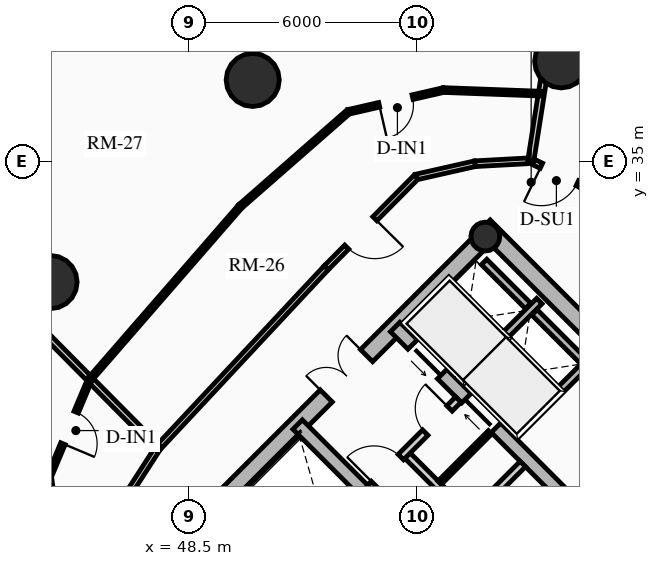
"""IFC4 building model, lengths in metres.
Left out: names, types, materials, properties, quantities, classifications, styles, units other than length and angle.
Written with IfcOpenShell. Run it as: python <this file> out.ifc"""

import sys

from ifc_helpers import new_model, si_unit, direction, frame, frame_2d, origin, origin_2d, place, context, subcontext, project, spatial, rectangle, circle, hollow_circle, extrude, source, transform, mapped, element, fill, save


model = new_model("IFC4")
c1 = context("Model", 3, precision=1e-05, world=origin(), true_north=direction((0.0, 1.0)))
c2 = subcontext(c1, "Body", "Model", "MODEL_VIEW")
j1 = project(units=[si_unit("LENGTHUNIT", "METRE"), si_unit("PLANEANGLEUNIT", "RADIAN")], contexts=[c1])
p1 = place(None, origin())
s1 = spatial("IfcSite", under=j1, at=p1, CompositionType="ELEMENT")
p2 = place(p1, origin())
s2 = spatial("IfcBuilding", under=s1, at=p2, CompositionType="ELEMENT")
p3 = place(p2, frame((0.0, 0.0, 90.52)))
s3 = spatial("IfcBuildingStorey", under=s2, at=p3, CompositionType="ELEMENT", Elevation=90.52)
p4 = place(p3, frame((66.303, 23.263, 0.0), z_axis=(0.0, 0.0, 1.0), x_axis=(-0.707106781187, 0.707106781187, 0.0)))
e1 = element("IfcWall", 1, at=p4, inside=s3, PredefinedType="SHEAR", context=c2, shape_type="SweptSolid", body=[
    extrude(rectangle(XDim=14.2, YDim=0.45, at=frame_2d((7.1, 0.0))), origin(), (0.0, 0.0, 1.0), 2.91),
])
p5 = place(p3, frame((48.856, 25.578, 0.0), z_axis=(0.0, 0.0, 1.0), x_axis=(0.707106781187, 0.707106781187, 0.0)))
e2 = element("IfcWall", 2, at=p5, inside=s3, PredefinedType="SHEAR", context=c2, shape_type="SweptSolid", body=[
    extrude(rectangle(XDim=10.7, YDim=0.45, at=frame_2d((5.35, 0.0))), origin(), (0.0, 0.0, 1.0), 2.91),
])
m1 = source(origin(), c2, "Body", "SweptSolid", [
    extrude(rectangle(XDim=1.5, YDim=2.02, at=frame_2d((0.75, 1.01))), frame((0.0, 0.235, 0.0), z_axis=(0.0, -1.0, 0.0), x_axis=(1.0, 0.0, 0.0)), (0.0, 0.0, 1.0), 0.47),
])
p6 = place(p5, frame((4.6, 0.0, 0.0)))
e3 = element("IfcOpeningElement", 3, at=p6, cuts=e2, PredefinedType="OPENING", context=c2, shape_type="MappedRepresentation", body=[
    mapped(m1, transform((0.0, 0.0, 0.0), x_axis=(1.0, 0.0, 0.0), y_axis=(0.0, 1.0, 0.0), z_axis=(0.0, 0.0, 1.0), scale=1.0)),
])
p7 = place(p3, frame((61.078, 18.355, 0.0), z_axis=(0.0, 0.0, 1.0), x_axis=(-0.707106781187, 0.707106781187, 0.0)))
e4 = element("IfcWall", 4, at=p7, inside=s3, PredefinedType="SHEAR", context=c2, shape_type="SweptSolid", body=[
    extrude(rectangle(XDim=13.75, YDim=0.35, at=frame_2d((6.875, 0.0))), origin(), (0.0, 0.0, 1.0), 2.91),
])
m2 = source(origin(), c2, "Body", "SweptSolid", [
    extrude(rectangle(XDim=1.1, YDim=2.015, at=frame_2d((0.55, 1.007))), frame((0.0, 0.185, 0.0), z_axis=(0.0, -1.0, 0.0), x_axis=(1.0, 0.0, 0.0)), (0.0, 0.0, 1.0), 0.37),
])
p8 = place(p7, frame((4.875, 0.0, 0.0)))
e5 = element("IfcOpeningElement", 5, at=p8, cuts=e4, PredefinedType="OPENING", context=c2, shape_type="MappedRepresentation", body=[
    mapped(m2, transform((0.0, 0.0, 0.0), x_axis=(1.0, 0.0, 0.0), y_axis=(0.0, 1.0, 0.0), z_axis=(0.0, 0.0, 1.0), scale=1.0)),
])
m3 = source(origin(), c2, "Body", "SweptSolid", [
    extrude(rectangle(XDim=1.15, YDim=2.02, at=frame_2d((0.575, 1.01))), frame((0.0, 0.185, 0.0), z_axis=(0.0, -1.0, 0.0), x_axis=(1.0, 0.0, 0.0)), (0.0, 0.0, 1.0), 0.37),
])
p9 = place(p7, frame((7.295, 0.0, 0.0)))
e6 = element("IfcOpeningElement", 6, at=p9, cuts=e4, PredefinedType="OPENING", context=c2, shape_type="MappedRepresentation", body=[
    mapped(m3, transform((0.0, 0.0, 0.0), x_axis=(1.0, 0.0, 0.0), y_axis=(0.0, 1.0, 0.0), z_axis=(0.0, 0.0, 1.0), scale=1.0)),
])
p10 = place(p3, frame((63.645, 20.922, 0.0), z_axis=(0.0, 0.0, 1.0), x_axis=(-0.707106781187, 0.707106781187, 0.0)))
e7 = element("IfcWall", 7, at=p10, inside=s3, PredefinedType="SHEAR", context=c2, shape_type="SweptSolid", body=[
    extrude(rectangle(XDim=13.75, YDim=0.35, at=frame_2d((6.875, 0.0))), origin(), (0.0, 0.0, 1.0), 2.91),
])
p11 = place(p10, frame((10.0, 0.0, 0.0)))
e8 = element("IfcOpeningElement", 8, at=p11, cuts=e7, PredefinedType="OPENING", context=c2, shape_type="MappedRepresentation", body=[
    mapped(m2, transform((0.0, 0.0, 0.0), x_axis=(1.0, 0.0, 0.0), y_axis=(0.0, 1.0, 0.0), z_axis=(0.0, 0.0, 1.0), scale=1.0)),
])
p12 = place(p10, frame((12.0, 0.0, 0.0)))
e9 = element("IfcOpeningElement", 9, at=p12, cuts=e7, PredefinedType="OPENING", context=c2, shape_type="MappedRepresentation", body=[
    mapped(m2, transform((0.0, 0.0, 0.0), x_axis=(1.0, 0.0, 0.0), y_axis=(0.0, 1.0, 0.0), z_axis=(0.0, 0.0, 1.0), scale=1.0)),
])
p13 = place(p10, frame((5.305, 0.0, 0.0)))
e10 = element("IfcOpeningElement", 10, at=p13, cuts=e7, PredefinedType="OPENING", context=c2, shape_type="MappedRepresentation", body=[
    mapped(m3, transform((0.0, 0.0, 0.0), x_axis=(1.0, 0.0, 0.0), y_axis=(0.0, 1.0, 0.0), z_axis=(0.0, 0.0, 1.0), scale=1.0)),
])
p14 = place(p3, frame((56.294, 33.024, 0.0), z_axis=(0.0, 0.0, 1.0), x_axis=(0.707106781187, 0.707106781187, 0.0)))
e11 = element("IfcColumn", 11, at=p14, inside=s3, PredefinedType="COLUMN", context=c2, shape_type="SweptSolid", body=[
    extrude(hollow_circle(Radius=0.38, WallThickness=0.032, at=origin_2d()), origin(), (0.0, 0.0, 1.0), 2.91),
])
for number, where, z_axis, x_axis in (
    (12, (58.291, 37.635, 0.0), (0.0, 0.0, 1.0), (1.0, 0.0, 0.0)),
    (13, (50.173, 37.146, 0.0), (0.0, 0.0, 1.0), (1.0, 0.0, 0.0)),
    (14, (44.854, 31.827, 0.0), (0.0, 0.0, 1.0), (1.0, 0.0, 0.0)),
):
    element("IfcColumn", number, at=place(p3, frame(where, z_axis=z_axis, x_axis=x_axis)), inside=s3, PredefinedType="USERDEFINED", context=c2, shape_type="SweptSolid", body=[
        extrude(circle(Radius=0.7, at=origin_2d()), origin(), (0.0, 0.0, 1.0), 2.91),
    ])
p15 = place(p3, frame((57.062, 27.781, 0.0), z_axis=(0.0, 0.0, 1.0), x_axis=(0.707106781187, 0.707106781187, 0.0)))
e15 = element("IfcWall", 15, at=p15, inside=s3, PredefinedType="SHEAR", context=c2, shape_type="SweptSolid", body=[
    extrude(rectangle(XDim=2.97, YDim=0.2, at=frame_2d((1.485, 0.0))), origin(), (0.0, 0.0, 1.0), 2.91),
])
p16 = place(p3, frame((55.615, 29.227, 0.0), z_axis=(0.0, 0.0, 1.0), x_axis=(0.707147878904, 0.70706568108, 0.0)))
e16 = element("IfcWall", 16, at=p16, inside=s3, PredefinedType="SHEAR", context=c2, shape_type="SweptSolid", body=[
    extrude(rectangle(XDim=2.97, YDim=0.2, at=frame_2d((1.485, 0.0))), origin(), (0.0, 0.0, 1.0), 2.91),
])
p17 = place(p3, frame((58.865, 29.754, 0.0), z_axis=(0.0, 0.0, 1.0), x_axis=(-0.707174411312, 0.707039144592, 0.0)))
e17 = element("IfcWall", 17, at=p17, inside=s3, PredefinedType="SHEAR", context=c2, shape_type="SweptSolid", body=[
    extrude(rectangle(XDim=1.805, YDim=0.2, at=frame_2d((0.902, 0.0))), origin(), (0.0, 0.0, 1.0), 2.91),
])
p18 = place(p3, frame((57.419, 31.2, 0.0), z_axis=(0.0, 0.0, 1.0), x_axis=(-0.707032117043, 0.707181437447, 0.0)))
e18 = element("IfcWall", 18, at=p18, inside=s3, PredefinedType="SHEAR", context=c2, shape_type="SweptSolid", body=[
    extrude(rectangle(XDim=1.635, YDim=0.2, at=frame_2d((0.817, 0.0))), origin(), (0.0, 0.0, 1.0), 2.91),
])
p19 = place(p3, frame((54.961, 24.719, 0.0), z_axis=(0.0, 0.0, 1.0), x_axis=(0.707106781187, 0.707106781187, 0.0)))
e19 = element("IfcWall", 19, at=p19, inside=s3, PredefinedType="PARTITIONING", context=c2, shape_type="SweptSolid", body=[
    extrude(rectangle(XDim=3.28, YDim=0.2, at=frame_2d((1.64, 0.0))), origin(), (0.0, 0.0, 1.0), 2.655),
])
m4 = source(origin(), c2, "Body", "SweptSolid", [
    extrude(rectangle(XDim=0.9, YDim=2.005, at=frame_2d((0.45, 1.002))), frame((0.0, 0.11, 0.0), z_axis=(0.0, -1.0, 0.0), x_axis=(1.0, 0.0, 0.0)), (0.0, 0.0, 1.0), 0.22),
])
p20 = place(p19, frame((0.16, 0.0, 0.0)))
e20 = element("IfcOpeningElement", 20, at=p20, cuts=e19, PredefinedType="OPENING", context=c2, shape_type="MappedRepresentation", body=[
    mapped(m4, transform((0.0, 0.0, 0.0), x_axis=(1.0, 0.0, 0.0), y_axis=(0.0, 1.0, 0.0), z_axis=(0.0, 0.0, 1.0), scale=1.0)),
])
p21 = place(p3, frame((55.874, 25.631, 0.0), z_axis=(0.0, 0.0, 1.0), x_axis=(-0.707157639372, 0.707055919343, 0.0)))
e21 = element("IfcWall", 21, at=p21, inside=s3, PredefinedType="PARTITIONING", context=c2, shape_type="SweptSolid", body=[
    extrude(rectangle(XDim=2.4, YDim=0.2, at=frame_2d((1.2, 0.0))), origin(), (0.0, 0.0, 1.0), 2.655),
])
p22 = place(p21, frame((0.14, 0.0, 0.0)))
e22 = element("IfcOpeningElement", 22, at=p22, cuts=e21, PredefinedType="OPENING", context=c2, shape_type="MappedRepresentation", body=[
    mapped(m4, transform((0.0, 0.0, 0.0), x_axis=(1.0, 0.0, 0.0), y_axis=(0.0, 1.0, 0.0), z_axis=(0.0, 0.0, 1.0), scale=1.0)),
])
p23 = place(p3, frame((53.264, 26.416, 0.0), z_axis=(0.0, 0.0, 1.0), x_axis=(0.707106781187, 0.707106781187, 0.0)))
e23 = element("IfcWall", 23, at=p23, inside=s3, PredefinedType="PARTITIONING", context=c2, shape_type="SweptSolid", body=[
    extrude(rectangle(XDim=3.28, YDim=0.2, at=frame_2d((1.64, 0.0))), origin(), (0.0, 0.0, 1.0), 2.655),
])
m5 = source(origin(), c2, "Body", "SweptSolid", [
    extrude(rectangle(XDim=1.0, YDim=2.015, at=frame_2d((0.5, 1.007))), frame((0.0, 0.11, 0.0), z_axis=(0.0, -1.0, 0.0), x_axis=(1.0, 0.0, 0.0)), (0.0, 0.0, 1.0), 0.22),
])
p24 = place(p23, frame((0.14, 0.0, 0.0)))
e24 = element("IfcOpeningElement", 24, at=p24, cuts=e23, PredefinedType="OPENING", context=c2, shape_type="MappedRepresentation", body=[
    mapped(m5, transform((0.0, 0.0, 0.0), x_axis=(1.0, 0.0, 0.0), y_axis=(0.0, 1.0, 0.0), z_axis=(0.0, 0.0, 1.0), scale=1.0)),
])
p25 = place(p23, frame((2.05, 0.0, 0.0)))
e25 = element("IfcOpeningElement", 25, at=p25, cuts=e23, PredefinedType="OPENING", context=c2, shape_type="MappedRepresentation", body=[
    mapped(m4, transform((0.0, 0.0, 0.0), x_axis=(1.0, 0.0, 0.0), y_axis=(0.0, 1.0, 0.0), z_axis=(0.0, 0.0, 1.0), scale=1.0)),
])
p26 = place(p3, frame((55.089, 26.543, 0.0), z_axis=(0.0, 0.0, 1.0), x_axis=(0.707106781187, 0.707106781187, 0.0)))
e26 = element("IfcWall", 26, at=p26, inside=s3, PredefinedType="PARTITIONING", context=c2, shape_type="SweptSolid", body=[
    extrude(rectangle(XDim=1.88, YDim=0.125, at=frame_2d((0.94, 0.0))), origin(), (0.0, 0.0, 1.0), 2.655),
])
p27 = place(p3, frame((58.823, 34.378, 0.0), z_axis=(0.0, 0.0, 1.0), x_axis=(-0.900449137666, 0.434961320668, 0.0)))
e27 = element("IfcWall", 27, at=p27, inside=s3, PredefinedType="PARTITIONING", context=c2, shape_type="SweptSolid", body=[
    extrude(rectangle(XDim=1.479, YDim=0.15, at=frame_2d((0.74, 0.0))), origin(), (0.0, 0.0, 1.0), 2.225),
])
m6 = source(origin(), c2, "Body", "SweptSolid", [
    extrude(rectangle(XDim=1.05, YDim=2.015, at=frame_2d((0.525, 1.007))), frame((0.0, 0.085, 0.0), z_axis=(0.0, -1.0, 0.0), x_axis=(1.0, 0.0, 0.0)), (0.0, 0.0, 1.0), 0.17),
])
p28 = place(p27, frame((0.12, 0.0, 0.0)))
e28 = element("IfcOpeningElement", 28, at=p28, cuts=e27, PredefinedType="OPENING", context=c2, shape_type="MappedRepresentation", body=[
    mapped(m6, transform((0.0, 0.0, 0.0), x_axis=(1.0, 0.0, 0.0), y_axis=(0.0, 1.0, 0.0), z_axis=(0.0, 0.0, 1.0), scale=1.0)),
])
p29 = place(p3, frame((57.491, 35.021, 0.0), z_axis=(0.0, 0.0, 1.0), x_axis=(-0.9985194771, -0.054395347698, 0.0)))
e29 = element("IfcWall", 29, at=p29, inside=s3, PredefinedType="PARTITIONING", context=c2, shape_type="SweptSolid", body=[
    extrude(rectangle(XDim=1.472, YDim=0.15, at=frame_2d((0.736, 0.0))), origin(), (0.0, 0.0, 1.0), 2.225),
])
p30 = place(p3, frame((56.021, 34.941, 0.0), z_axis=(0.0, 0.0, 1.0), x_axis=(-0.975309543901, -0.220842236847, 0.0)))
e30 = element("IfcWall", 30, at=p30, inside=s3, PredefinedType="PARTITIONING", context=c2, shape_type="SweptSolid", body=[
    extrude(rectangle(XDim=1.585, YDim=0.15, at=frame_2d((0.792, 0.0))), origin(), (0.0, 0.0, 1.0), 2.225),
])
p31 = place(p3, frame((54.475, 34.591, 0.0), z_axis=(0.0, 0.0, 1.0), x_axis=(-0.703869646439, -0.710329163714, 0.0)))
e31 = element("IfcWall", 31, at=p31, inside=s3, PredefinedType="PARTITIONING", context=c2, shape_type="SweptSolid", body=[
    extrude(rectangle(XDim=3.364, YDim=0.15, at=frame_2d((1.682, 0.0))), origin(), (0.0, 0.0, 1.0), 2.225),
])
p32 = place(p31, frame((1.546, 0.0, 0.0)))
e32 = element("IfcOpeningElement", 32, at=p32, cuts=e31, PredefinedType="OPENING", context=c2, shape_type="MappedRepresentation", body=[
    mapped(m6, transform((0.0, 0.0, 0.0), x_axis=(1.0, 0.0, 0.0), y_axis=(0.0, 1.0, 0.0), z_axis=(0.0, 0.0, 1.0), scale=1.0)),
])
p33 = place(p3, frame((52.107, 32.202, 0.0), z_axis=(0.0, 0.0, 1.0), x_axis=(-0.682605209028, -0.730787334734, 0.0)))
e33 = element("IfcWall", 33, at=p33, inside=s3, PredefinedType="PARTITIONING", context=c2, shape_type="SweptSolid", body=[
    extrude(rectangle(XDim=6.486, YDim=0.15, at=frame_2d((3.243, 0.0))), origin(), (0.0, 0.0, 1.0), 2.225),
])
p34 = place(p3, frame((47.68, 27.462, 0.0), z_axis=(0.0, 0.0, 1.0), x_axis=(-0.542097952486, -0.840315303865, 0.0)))
e34 = element("IfcWall", 34, at=p34, inside=s3, PredefinedType="PARTITIONING", context=c2, shape_type="SweptSolid", body=[
    extrude(rectangle(XDim=1.923, YDim=0.15, at=frame_2d((0.961, 0.0))), origin(), (0.0, 0.0, 1.0), 2.225),
])
p35 = place(p3, frame((57.491, 35.021, 0.0), z_axis=(0.0, 0.0, 1.0), x_axis=(0.155805268746, 0.98778779008, 0.0)))
e35 = element("IfcWall", 35, at=p35, inside=s3, PredefinedType="PARTITIONING", context=c2, shape_type="SweptSolid", body=[
    extrude(rectangle(XDim=6.376, YDim=0.16, at=frame_2d((3.188, 0.0))), origin(), (0.0, 0.0, 1.0), 2.179),
])
p36 = place(p3, frame((47.68, 27.462, 0.0), z_axis=(0.0, 0.0, 1.0), x_axis=(-0.703913074907, 0.710286127539, 0.0)))
e36 = element("IfcWall", 36, at=p36, inside=s3, PredefinedType="PARTITIONING", context=c2, shape_type="SweptSolid", body=[
    extrude(rectangle(XDim=9.079, YDim=0.16, at=frame_2d((4.54, 0.0))), origin(), (0.0, 0.0, 1.0), 2.179),
])
p37 = place(p3, frame((57.769, 36.785, 0.0), z_axis=(0.0, 0.0, 1.0), x_axis=(-0.999316779648, 0.036959084311, 0.0)))
e37 = element("IfcWall", 37, at=p37, inside=s3, PredefinedType="PARTITIONING", context=c2, shape_type="SweptSolid", body=[
    extrude(rectangle(XDim=2.576, YDim=0.125, at=frame_2d((1.288, 0.0))), origin(), (0.0, 0.0, 1.0), 2.292),
])
p38 = place(p3, frame((55.194, 36.88, 0.0), z_axis=(0.0, 0.0, 1.0), x_axis=(-0.97469098149, -0.22355645954, 0.0)))
e38 = element("IfcWall", 38, at=p38, inside=s3, PredefinedType="PARTITIONING", context=c2, shape_type="SweptSolid", body=[
    extrude(rectangle(XDim=2.573, YDim=0.125, at=frame_2d((1.287, 0.0))), origin(), (0.0, 0.0, 1.0), 2.225),
])
m7 = source(origin(), c2, "Body", "SweptSolid", [
    extrude(rectangle(XDim=0.9, YDim=2.005, at=frame_2d((0.45, 1.002))), frame((0.0, 0.073, 0.0), z_axis=(0.0, -1.0, 0.0), x_axis=(1.0, 0.0, 0.0)), (0.0, 0.0, 1.0), 0.145),
])
p39 = place(p38, frame((0.836, 0.0, 0.0)))
e39 = element("IfcOpeningElement", 39, at=p39, cuts=e38, PredefinedType="OPENING", context=c2, shape_type="MappedRepresentation", body=[
    mapped(m7, transform((0.0, 0.0, 0.0), x_axis=(1.0, 0.0, 0.0), y_axis=(0.0, 1.0, 0.0), z_axis=(0.0, 0.0, 1.0), scale=1.0)),
])
p40 = place(p3, frame((52.687, 36.305, 0.0), z_axis=(0.0, 0.0, 1.0), x_axis=(-0.752332345919, -0.658783759123, 0.0)))
e40 = element("IfcWall", 40, at=p40, inside=s3, PredefinedType="PARTITIONING", context=c2, shape_type="SweptSolid", body=[
    extrude(rectangle(XDim=3.776, YDim=0.125, at=frame_2d((1.888, 0.0))), origin(), (0.0, 0.0, 1.0), 2.225),
])
p41 = place(p3, frame((49.845, 33.817, 0.0), z_axis=(0.0, 0.0, 1.0), x_axis=(-0.656101508867, -0.754672650931, 0.0)))
e41 = element("IfcWall", 41, at=p41, inside=s3, PredefinedType="PARTITIONING", context=c2, shape_type="SweptSolid", body=[
    extrude(rectangle(XDim=6.029, YDim=0.125, at=frame_2d((3.014, 0.0))), origin(), (0.0, 0.0, 1.0), 2.225),
])
p42 = place(p3, frame((45.89, 29.268, 0.0), z_axis=(0.0, 0.0, 1.0), x_axis=(-0.387057419757, -0.922055613188, 0.0)))
e42 = element("IfcWall", 42, at=p42, inside=s3, PredefinedType="PARTITIONING", context=c2, shape_type="SweptSolid", body=[
    extrude(rectangle(XDim=2.774, YDim=0.125, at=frame_2d((1.387, 0.0))), origin(), (0.0, 0.0, 1.0), 2.225),
])
p43 = place(p42, frame((0.937, 0.0, 0.0)))
e43 = element("IfcOpeningElement", 43, at=p43, cuts=e42, PredefinedType="OPENING", context=c2, shape_type="MappedRepresentation", body=[
    mapped(m7, transform((0.0, 0.0, 0.0), x_axis=(1.0, 0.0, 0.0), y_axis=(0.0, 1.0, 0.0), z_axis=(0.0, 0.0, 1.0), scale=1.0)),
])
p44 = place(p3, frame((44.816, 26.71, 0.0), z_axis=(0.0, 0.0, 1.0), x_axis=(0.131724981355, -0.991286300363, 0.0)))
e44 = element("IfcWall", 44, at=p44, inside=s3, PredefinedType="PARTITIONING", context=c2, shape_type="SweptSolid", body=[
    extrude(rectangle(XDim=2.515, YDim=0.125, at=frame_2d((1.258, 0.0))), origin(), (0.0, 0.0, 1.0), 2.655),
])
m8 = source(origin(), c2, "Body", "SweptSolid", [
    extrude(rectangle(XDim=1.1, YDim=2.015, at=frame_2d((0.55, 1.007))), frame((0.0, 0.025, 0.0), z_axis=(0.0, -1.0, 0.0), x_axis=(1.0, 0.0, 0.0)), (0.0, 0.0, 1.0), 0.05),
])
p45 = place(p11, origin())
e45 = element("IfcDoor", 45, at=p45, inside=s3, OperationType="SLIDING_TO_RIGHT", PredefinedType="DOOR", context=c2, shape_type="MappedRepresentation", body=[
    mapped(m8, transform((0.0, 0.0, 0.0), x_axis=(1.0, 0.0, 0.0), y_axis=(0.0, 1.0, 0.0), z_axis=(0.0, 0.0, 1.0), scale=1.0)),
])
fill(e8, e45)
p46 = place(p12, origin())
e46 = element("IfcDoor", 46, at=p46, inside=s3, OperationType="SLIDING_TO_LEFT", PredefinedType="DOOR", context=c2, shape_type="MappedRepresentation", body=[
    mapped(m8, transform((0.0, 0.0, 0.0), x_axis=(1.0, 0.0, 0.0), y_axis=(0.0, 1.0, 0.0), z_axis=(0.0, 0.0, 1.0), scale=1.0)),
])
fill(e9, e46)
m9 = source(origin(), c2, "Body", "SweptSolid", [
    extrude(rectangle(XDim=1.5, YDim=2.02, at=frame_2d((0.75, 1.01))), frame((0.0, 0.025, 0.0), z_axis=(0.0, -1.0, 0.0), x_axis=(1.0, 0.0, 0.0)), (0.0, 0.0, 1.0), 0.05),
])
p47 = place(p6, origin())
e47 = element("IfcDoor", 47, at=p47, inside=s3, OperationType="DOUBLE_DOOR_SINGLE_SWING", PredefinedType="DOOR", context=c2, shape_type="MappedRepresentation", body=[
    mapped(m9, transform((0.0, 0.0, 0.0), x_axis=(1.0, 0.0, 0.0), y_axis=(0.0, 1.0, 0.0), z_axis=(0.0, 0.0, 1.0), scale=1.0)),
])
fill(e3, e47)
m10 = source(origin(), c2, "Body", "SweptSolid", [
    extrude(rectangle(XDim=1.0, YDim=2.015, at=frame_2d((0.5, 1.007))), frame((0.0, 0.025, 0.0), z_axis=(0.0, -1.0, 0.0), x_axis=(1.0, 0.0, 0.0)), (0.0, 0.0, 1.0), 0.05),
])
p48 = place(p24, origin())
e48 = element("IfcDoor", 48, at=p48, inside=s3, OperationType="SINGLE_SWING_LEFT", PredefinedType="DOOR", context=c2, shape_type="MappedRepresentation", body=[
    mapped(m10, transform((0.0, 0.0, 0.0), x_axis=(1.0, 0.0, 0.0), y_axis=(0.0, 1.0, 0.0), z_axis=(0.0, 0.0, 1.0), scale=1.0)),
])
fill(e24, e48)
m11 = source(origin(), c2, "Body", "SweptSolid", [
    extrude(rectangle(XDim=0.9, YDim=2.005, at=frame_2d((0.45, 1.002))), frame((0.0, 0.025, 0.0), z_axis=(0.0, -1.0, 0.0), x_axis=(1.0, 0.0, 0.0)), (0.0, 0.0, 1.0), 0.05),
])
p49 = place(p25, origin())
e49 = element("IfcDoor", 49, at=p49, inside=s3, OperationType="SINGLE_SWING_RIGHT", PredefinedType="DOOR", context=c2, shape_type="MappedRepresentation", body=[
    mapped(m11, transform((0.0, 0.0, 0.0), x_axis=(1.0, 0.0, 0.0), y_axis=(0.0, 1.0, 0.0), z_axis=(0.0, 0.0, 1.0), scale=1.0)),
])
fill(e25, e49)
m12 = source(origin(), c2, "Body", "SweptSolid", [
    extrude(rectangle(XDim=1.05, YDim=2.015, at=frame_2d((0.525, 1.007))), frame((0.0, 0.025, 0.0), z_axis=(0.0, -1.0, 0.0), x_axis=(1.0, 0.0, 0.0)), (0.0, 0.0, 1.0), 0.05),
])
p50 = place(p32, origin())
e50 = element("IfcDoor", 50, at=p50, inside=s3, OperationType="SINGLE_SWING_LEFT", PredefinedType="DOOR", context=c2, shape_type="MappedRepresentation", body=[
    mapped(m12, transform((0.0, 0.0, 0.0), x_axis=(1.0, 0.0, 0.0), y_axis=(0.0, 1.0, 0.0), z_axis=(0.0, 0.0, 1.0), scale=1.0)),
])
fill(e32, e50)
p51 = place(p39, origin())
e51 = element("IfcDoor", 51, at=p51, inside=s3, OperationType="SINGLE_SWING_RIGHT", PredefinedType="DOOR", context=c2, shape_type="MappedRepresentation", body=[
    mapped(m11, transform((0.0, 0.0, 0.0), x_axis=(1.0, 0.0, 0.0), y_axis=(0.0, 1.0, 0.0), z_axis=(0.0, 0.0, 1.0), scale=1.0)),
])
fill(e39, e51)
p52 = place(p43, origin())
e52 = element("IfcDoor", 52, at=p52, inside=s3, OperationType="SINGLE_SWING_RIGHT", PredefinedType="DOOR", context=c2, shape_type="MappedRepresentation", body=[
    mapped(m11, transform((0.0, 0.0, 0.0), x_axis=(1.0, 0.0, 0.0), y_axis=(0.0, 1.0, 0.0), z_axis=(0.0, 0.0, 1.0), scale=1.0)),
])
fill(e43, e52)
p53 = place(p28, origin())
e53 = element("IfcDoor", 53, at=p53, inside=s3, OperationType="SINGLE_SWING_RIGHT", PredefinedType="DOOR", context=c2, shape_type="MappedRepresentation", body=[
    mapped(m12, transform((0.0, 0.0, 0.0), x_axis=(1.0, 0.0, 0.0), y_axis=(0.0, 1.0, 0.0), z_axis=(0.0, 0.0, 1.0), scale=1.0)),
])
fill(e28, e53)
save(model, sys.argv[1])
